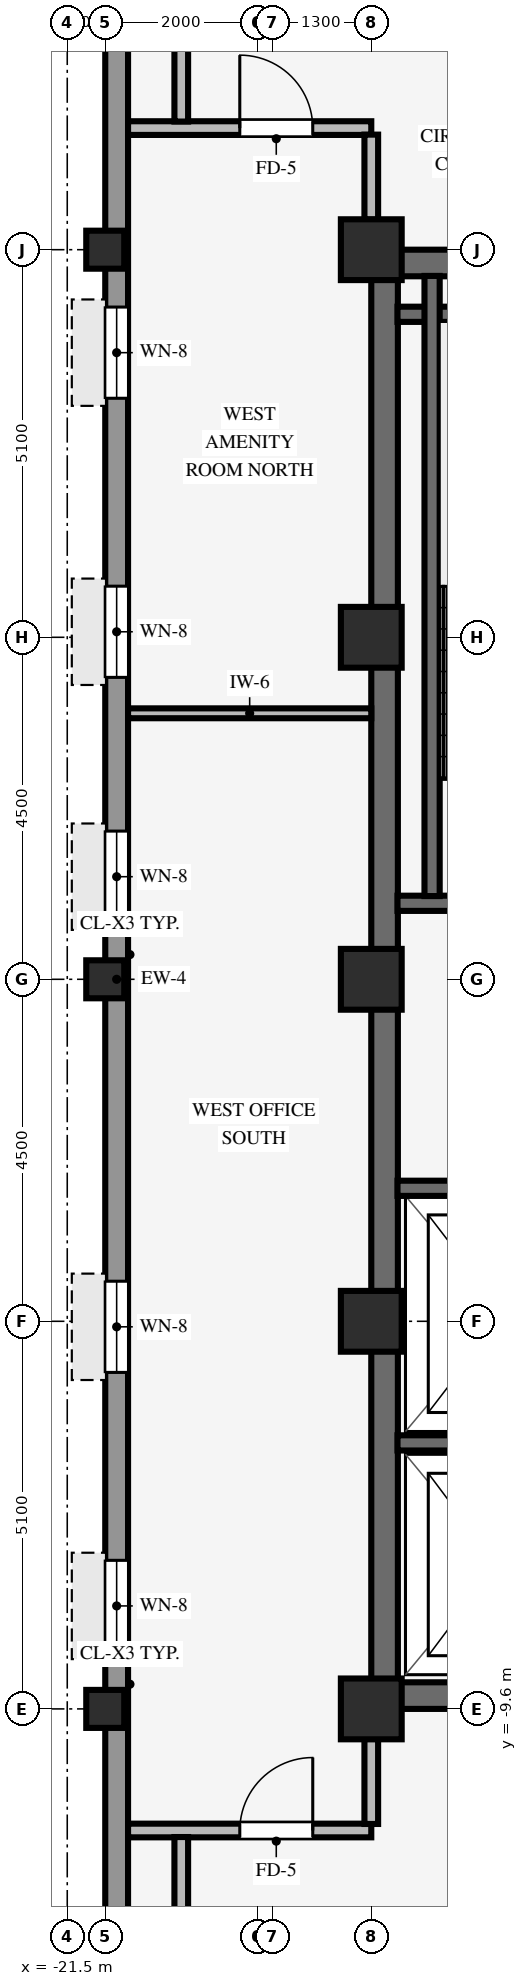
"""IFC4 building model, lengths in metres.
Left out: names, types, materials, properties, quantities, classifications, styles, units other than length and angle.
Written with IfcOpenShell. Run it as: python <this file> out.ifc"""

import sys

from ifc_helpers import new_model, si_unit, direction, frame, frame_2d, origin, origin_2d, place, context, subcontext, project, spatial, rectangle, hollow_rectangle, extrude, source, transform, mapped, element, fill, save


model = new_model("IFC4")
c1 = context("Model", 3, precision=1e-05, world=origin(), true_north=direction((0.0, 1.0)))
c2 = subcontext(c1, "Body", "Model", "MODEL_VIEW")
j1 = project(units=[si_unit("LENGTHUNIT", "METRE"), si_unit("PLANEANGLEUNIT", "RADIAN")], contexts=[c1])
p1 = place(None, origin())
s1 = spatial("IfcSite", under=j1, at=p1, CompositionType="ELEMENT")
p2 = place(p1, origin())
s2 = spatial("IfcBuilding", under=s1, at=p2, CompositionType="ELEMENT")
p3 = place(p2, frame((0.0, 0.0, 265.25)))
s3 = spatial("IfcBuildingStorey", under=s2, at=p3, CompositionType="ELEMENT", Elevation=265.25)
for number, where, z_axis, x_axis in (
    (1, (-17.5, -9.425, 0.0), (0.0, 0.0, 1.0), (1.0, 0.0, 0.0)),
    (2, (-17.5, 9.425, 0.0), (0.0, 0.0, 1.0), (1.0, 0.0, 0.0)),
):
    element("IfcWall", number, at=place(p3, frame(where, z_axis=z_axis, x_axis=x_axis)), inside=s3, PredefinedType="SHEAR", context=c2, shape_type="SweptSolid", body=[
        extrude(rectangle(XDim=8.5, YDim=0.35, at=frame_2d((4.25, 0.0))), origin(), (0.0, 0.0, 1.0), 3.37),
    ])
p4 = place(p3, frame((-17.325, -9.255, 0.0), z_axis=(0.0, 0.0, 1.0), x_axis=(0.0, 1.0, 0.0)))
e3 = element("IfcWall", 3, at=p4, inside=s3, PredefinedType="SHEAR", context=c2, shape_type="SweptSolid", body=[
    extrude(rectangle(XDim=18.51, YDim=0.35, at=frame_2d((9.255, 0.0))), origin(), (0.0, 0.0, 1.0), 3.37),
])
for number, where, z_axis, x_axis in (
    (4, (-17.5, -9.6, 0.0), (0.0, 0.0, 1.0), (1.0, 0.0, 0.0)),
    (5, (-17.5, -4.5, 0.0), (0.0, 0.0, 1.0), (1.0, 0.0, 0.0)),
    (6, (-17.5, 4.5, 0.0), (0.0, 0.0, 1.0), (1.0, 0.0, 0.0)),
    (7, (-17.5, 9.6, 0.0), (0.0, 0.0, 1.0), (1.0, 0.0, 0.0)),
    (8, (-17.5, 0.0, 0.0), (0.0, 0.0, 1.0), (1.0, 0.0, 0.0)),
):
    element("IfcColumn", number, at=place(p3, frame(where, z_axis=z_axis, x_axis=x_axis)), inside=s3, PredefinedType="COLUMN", context=c2, shape_type="SweptSolid", body=[
        extrude(rectangle(XDim=0.8, YDim=0.8, at=origin_2d()), origin(), (0.0, 0.0, 1.0), 3.37),
    ])
for number, where, z_axis, x_axis in (
    (9, (-21.0, -9.6, 0.0), (0.0, 0.0, 1.0), (1.0, 0.0, 0.0)),
    (10, (-21.0, 0.0, 0.0), (0.0, 0.0, 1.0), (1.0, 0.0, 0.0)),
    (11, (-21.0, 9.6, 0.0), (0.0, 0.0, 1.0), (1.0, 0.0, 0.0)),
):
    element("IfcColumn", number, at=place(p3, frame(where, z_axis=z_axis, x_axis=x_axis)), inside=s3, PredefinedType="COLUMN", context=c2, shape_type="SweptSolid", body=[
        extrude(hollow_rectangle(XDim=0.5, YDim=0.5, WallThickness=0.032, InnerFilletRadius=0.032, OuterFilletRadius=0.064, at=origin_2d()), origin(), (0.0, 0.0, 1.0), 3.37),
    ])
p5 = place(p3, frame((-20.85, -17.004, 0.0), z_axis=(0.0, 0.0, 1.0), x_axis=(0.0, 1.0, 0.0)))
e12 = element("IfcWall", 12, at=p5, inside=s3, PredefinedType="STANDARD", context=c2, shape_type="SweptSolid", body=[
    extrude(rectangle(XDim=34.008, YDim=0.3, at=frame_2d((17.004, 0.0))), origin(), (0.0, 0.0, 1.0), 2.705),
])
p6 = place(p5, frame((1.786, 0.0, 0.8)))
e13 = element("IfcOpeningElement", 13, at=p6, cuts=e12, PredefinedType="OPENING", context=c2, shape_type="SweptSolid", body=[
    extrude(rectangle(XDim=1.2, YDim=1.48, at=frame_2d((0.6, 0.74))), frame((0.0, 0.16, 0.0), z_axis=(0.0, -1.0, 0.0), x_axis=(1.0, 0.0, 0.0)), (0.0, 0.0, 1.0), 0.32),
])
p7 = place(p5, frame((8.159, 0.0, 0.8)))
e14 = element("IfcOpeningElement", 14, at=p7, cuts=e12, PredefinedType="OPENING", context=c2, shape_type="SweptSolid", body=[
    extrude(rectangle(XDim=1.2, YDim=1.48, at=frame_2d((0.6, 0.74))), frame((0.0, 0.16, 0.0), z_axis=(0.0, -1.0, 0.0), x_axis=(1.0, 0.0, 0.0)), (0.0, 0.0, 1.0), 0.32),
])
p8 = place(p5, frame((11.831, 0.0, 0.8)))
e15 = element("IfcOpeningElement", 15, at=p8, cuts=e12, PredefinedType="OPENING", context=c2, shape_type="SweptSolid", body=[
    extrude(rectangle(XDim=1.2, YDim=1.48, at=frame_2d((0.6, 0.74))), frame((0.0, 0.16, 0.0), z_axis=(0.0, -1.0, 0.0), x_axis=(1.0, 0.0, 0.0)), (0.0, 0.0, 1.0), 0.32),
])
p9 = place(p5, frame((17.754, 0.0, 0.8)))
e16 = element("IfcOpeningElement", 16, at=p9, cuts=e12, PredefinedType="OPENING", context=c2, shape_type="SweptSolid", body=[
    extrude(rectangle(XDim=1.2, YDim=1.48, at=frame_2d((0.6, 0.74))), frame((0.0, 0.16, 0.0), z_axis=(0.0, -1.0, 0.0), x_axis=(1.0, 0.0, 0.0)), (0.0, 0.0, 1.0), 0.32),
])
p10 = place(p5, frame((20.977, 0.0, 0.8)))
e17 = element("IfcOpeningElement", 17, at=p10, cuts=e12, PredefinedType="OPENING", context=c2, shape_type="SweptSolid", body=[
    extrude(rectangle(XDim=1.2, YDim=1.48, at=frame_2d((0.6, 0.74))), frame((0.0, 0.16, 0.0), z_axis=(0.0, -1.0, 0.0), x_axis=(1.0, 0.0, 0.0)), (0.0, 0.0, 1.0), 0.32),
])
p11 = place(p5, frame((24.649, 0.0, 0.8)))
e18 = element("IfcOpeningElement", 18, at=p11, cuts=e12, PredefinedType="OPENING", context=c2, shape_type="SweptSolid", body=[
    extrude(rectangle(XDim=1.2, YDim=1.48, at=frame_2d((0.6, 0.74))), frame((0.0, 0.16, 0.0), z_axis=(0.0, -1.0, 0.0), x_axis=(1.0, 0.0, 0.0)), (0.0, 0.0, 1.0), 0.32),
])
p12 = place(p5, frame((31.022, 0.0, 0.8)))
e19 = element("IfcOpeningElement", 19, at=p12, cuts=e12, PredefinedType="OPENING", context=c2, shape_type="SweptSolid", body=[
    extrude(rectangle(XDim=1.2, YDim=1.48, at=frame_2d((0.6, 0.74))), frame((0.0, 0.16, 0.0), z_axis=(0.0, -1.0, 0.0), x_axis=(1.0, 0.0, 0.0)), (0.0, 0.0, 1.0), 0.32),
])
for number, where, z_axis, x_axis in (
    (20, (-17.155, 1.0, 0.0), (0.0, 0.0, 1.0), (1.0, 0.0, 0.0)),
    (21, (-17.155, 8.75, 0.0), (0.0, 0.0, 1.0), (1.0, 0.0, 0.0)),
):
    element("IfcWall", number, at=place(p3, frame(where, z_axis=z_axis, x_axis=x_axis)), inside=s3, PredefinedType="SHEAR", context=c2, shape_type="SweptSolid", body=[
        extrude(rectangle(XDim=3.62, YDim=0.2, at=frame_2d((1.81, 0.0))), origin(), (0.0, 0.0, 1.0), 3.37),
    ])
p13 = place(p3, frame((-16.7, 1.095, 0.0), z_axis=(0.0, 0.0, 1.0), x_axis=(0.0, 1.0, 0.0)))
e22 = element("IfcWall", 22, at=p13, inside=s3, PredefinedType="SHEAR", context=c2, shape_type="SweptSolid", body=[
    extrude(rectangle(XDim=8.16, YDim=0.2, at=frame_2d((4.08, 0.0))), origin(), (0.0, 0.0, 1.0), 3.37),
])
p14 = place(p3, frame((-17.155, -6.1, 0.0), z_axis=(0.0, 0.0, 1.0), x_axis=(1.0, 0.0, 0.0)))
e23 = element("IfcWall", 23, at=p14, inside=s3, PredefinedType="SHEAR", context=c2, shape_type="SweptSolid", body=[
    extrude(rectangle(XDim=2.905, YDim=0.2, at=frame_2d((1.453, 0.0))), origin(), (0.0, 0.0, 1.0), 3.37),
])
p15 = place(p3, frame((-17.155, -2.75, 0.0), z_axis=(0.0, 0.0, 1.0), x_axis=(1.0, 0.0, 0.0)))
e24 = element("IfcWall", 24, at=p15, inside=s3, PredefinedType="SHEAR", context=c2, shape_type="SweptSolid", body=[
    extrude(rectangle(XDim=2.71, YDim=0.2, at=frame_2d((1.355, 0.0))), origin(), (0.0, 0.0, 1.0), 3.37),
])
p16 = place(p3, frame((-20.7, -11.2, 0.0), z_axis=(0.0, 0.0, 1.0), x_axis=(1.0, 0.0, 0.0)))
e25 = element("IfcWall", 25, at=p16, inside=s3, PredefinedType="PARTITIONING", context=c2, shape_type="SweptSolid", body=[
    extrude(rectangle(XDim=3.2, YDim=0.18, at=frame_2d((1.6, 0.0))), origin(), (0.0, 0.0, 1.0), 3.36),
])
p17 = place(p16, frame((1.47, 0.0, 0.0)))
e26 = element("IfcOpeningElement", 26, at=p17, cuts=e25, PredefinedType="OPENING", context=c2, shape_type="SweptSolid", body=[
    extrude(rectangle(XDim=0.96, YDim=2.1, at=frame_2d((0.48, 1.05))), frame((0.0, 0.1, 0.0), z_axis=(0.0, -1.0, 0.0), x_axis=(1.0, 0.0, 0.0)), (0.0, 0.0, 1.0), 0.2),
])
p18 = place(p3, frame((-20.7, 3.5, 0.0), z_axis=(0.0, 0.0, 1.0), x_axis=(1.0, 0.0, 0.0)))
e27 = element("IfcWall", 27, at=p18, inside=s3, PredefinedType="PARTITIONING", context=c2, shape_type="SweptSolid", body=[
    extrude(rectangle(XDim=3.2, YDim=0.13, at=frame_2d((1.6, 0.0))), origin(), (0.0, 0.0, 1.0), 3.36),
])
p19 = place(p3, frame((-20.7, 11.2, 0.0), z_axis=(0.0, 0.0, 1.0), x_axis=(1.0, 0.0, 0.0)))
e28 = element("IfcWall", 28, at=p19, inside=s3, PredefinedType="PARTITIONING", context=c2, shape_type="SweptSolid", body=[
    extrude(rectangle(XDim=3.2, YDim=0.18, at=frame_2d((1.6, 0.0))), origin(), (0.0, 0.0, 1.0), 3.36),
])
p20 = place(p19, frame((1.47, 0.0, 0.0)))
e29 = element("IfcOpeningElement", 29, at=p20, cuts=e28, PredefinedType="OPENING", context=c2, shape_type="SweptSolid", body=[
    extrude(rectangle(XDim=0.96, YDim=2.1, at=frame_2d((0.48, 1.05))), frame((0.0, 0.1, 0.0), z_axis=(0.0, -1.0, 0.0), x_axis=(1.0, 0.0, 0.0)), (0.0, 0.0, 1.0), 0.2),
])
for number, where, z_axis, x_axis in (
    (30, (-20.0, -13.514, 0.0), (0.0, 0.0, 1.0), (0.0, 1.0, 0.0)),
    (31, (-20.0, 11.286, 0.0), (0.0, 0.0, 1.0), (0.0, 1.0, 0.0)),
):
    element("IfcWall", number, at=place(p3, frame(where, z_axis=z_axis, x_axis=x_axis)), inside=s3, PredefinedType="PARTITIONING", context=c2, shape_type="SweptSolid", body=[
        extrude(rectangle(XDim=2.228, YDim=0.18, at=frame_2d((1.114, 0.0))), origin(), (0.0, 0.0, 1.0), 3.36),
    ])
for number, where, z_axis, x_axis in (
    (32, (-17.5, -11.114, 0.0), (0.0, 0.0, 1.0), (0.0, 1.0, 0.0)),
    (33, (-17.5, 9.996, 0.0), (0.0, 0.0, 1.0), (0.0, 1.0, 0.0)),
):
    element("IfcWall", number, at=place(p3, frame(where, z_axis=z_axis, x_axis=x_axis)), inside=s3, PredefinedType="PARTITIONING", context=c2, shape_type="SweptSolid", body=[
        extrude(rectangle(XDim=1.118, YDim=0.18, at=frame_2d((0.559, 0.0))), origin(), (0.0, 0.0, 1.0), 2.892),
    ])
m1 = source(origin(), c2, "Body", "SweptSolid", [
    extrude(rectangle(XDim=1.2, YDim=1.48, at=frame_2d((0.6, 0.74))), frame((0.0, 0.03, 0.0), z_axis=(0.0, -1.0, 0.0), x_axis=(1.0, 0.0, 0.0)), (0.0, 0.0, 1.0), 0.06),
])
p21 = place(p7, origin())
e34 = element("IfcWindow", 34, at=p21, inside=s3, PartitioningType="SINGLE_PANEL", PredefinedType="WINDOW", context=c2, shape_type="MappedRepresentation", body=[
    mapped(m1, transform((0.0, 0.0, 0.0), scale=1.0)),
])
fill(e14, e34)
p22 = place(p8, origin())
e35 = element("IfcWindow", 35, at=p22, inside=s3, PartitioningType="SINGLE_PANEL", PredefinedType="WINDOW", context=c2, shape_type="MappedRepresentation", body=[
    mapped(m1, transform((0.0, 0.0, 0.0), scale=1.0)),
])
fill(e15, e35)
p23 = place(p9, origin())
e36 = element("IfcWindow", 36, at=p23, inside=s3, PartitioningType="SINGLE_PANEL", PredefinedType="WINDOW", context=c2, shape_type="MappedRepresentation", body=[
    mapped(m1, transform((0.0, 0.0, 0.0), scale=1.0)),
])
fill(e16, e36)
p24 = place(p10, origin())
e37 = element("IfcWindow", 37, at=p24, inside=s3, PartitioningType="SINGLE_PANEL", PredefinedType="WINDOW", context=c2, shape_type="MappedRepresentation", body=[
    mapped(m1, transform((0.0, 0.0, 0.0), scale=1.0)),
])
fill(e17, e37)
p25 = place(p11, origin())
e38 = element("IfcWindow", 38, at=p25, inside=s3, PartitioningType="SINGLE_PANEL", PredefinedType="WINDOW", context=c2, shape_type="MappedRepresentation", body=[
    mapped(m1, transform((0.0, 0.0, 0.0), scale=1.0)),
])
fill(e18, e38)
m2 = source(origin(), c2, "Body", "SweptSolid", [
    extrude(rectangle(XDim=0.96, YDim=2.1, at=frame_2d((0.48, 1.05))), frame((0.0, 0.025, 0.0), z_axis=(0.0, -1.0, 0.0), x_axis=(1.0, 0.0, 0.0)), (0.0, 0.0, 1.0), 0.05),
])
p26 = place(p17, origin())
e39 = element("IfcDoor", 39, at=p26, inside=s3, OperationType="SINGLE_SWING_RIGHT", PredefinedType="DOOR", context=c2, shape_type="MappedRepresentation", body=[
    mapped(m2, transform((0.0, 0.0, 0.0), scale=1.0)),
])
fill(e26, e39)
p27 = place(p20, origin())
e40 = element("IfcDoor", 40, at=p27, inside=s3, OperationType="SINGLE_SWING_LEFT", PredefinedType="DOOR", context=c2, shape_type="MappedRepresentation", body=[
    mapped(m2, transform((0.0, 0.0, 0.0), scale=1.0)),
])
fill(e29, e40)
save(model, sys.argv[1])
